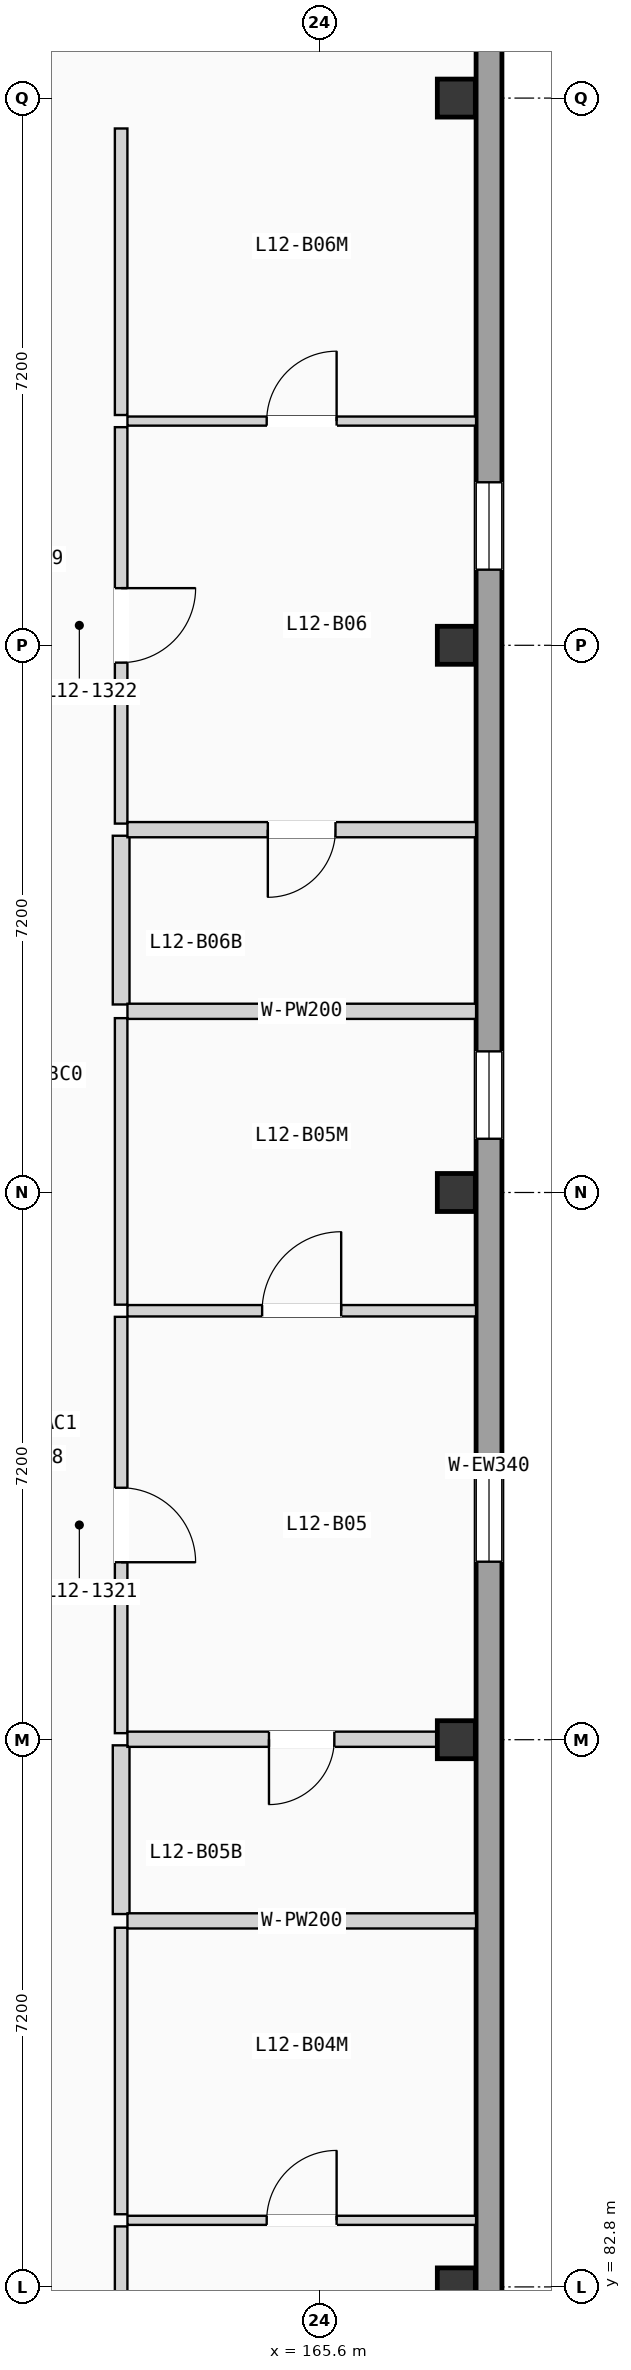
"""IFC4 building model, lengths in metres.
Left out: names, types, materials, properties, quantities, classifications, styles, units other than length and angle.
Written with IfcOpenShell. Run it as: python <this file> out.ifc"""

import sys

from ifc_helpers import new_model, si_unit, direction, frame, frame_2d, origin, origin_2d, place, context, subcontext, project, spatial, rectangle, extrude, element, fill, save


model = new_model("IFC4")
c1 = context("Model", 3, precision=1e-05, world=origin(), true_north=direction((0.0, 1.0)))
c2 = subcontext(c1, "Body", "Model", "MODEL_VIEW")
j1 = project(units=[si_unit("LENGTHUNIT", "METRE"), si_unit("PLANEANGLEUNIT", "RADIAN")], contexts=[c1])
p1 = place(None, origin())
s1 = spatial("IfcSite", under=j1, at=p1, CompositionType="ELEMENT")
p2 = place(p1, origin())
s2 = spatial("IfcBuilding", under=s1, at=p2, CompositionType="ELEMENT")
p3 = place(p2, frame((0.0, 0.0, 40.425)))
s3 = spatial("IfcBuildingStorey", under=s2, at=p3, CompositionType="ELEMENT", Elevation=40.425)
for number, where, z_axis, x_axis in (
    (1, (167.4, 82.8, 0.0), (0.0, 0.0, 1.0), (1.0, 0.0, 0.0)),
    (2, (167.4, 90.0, 0.0), (0.0, 0.0, 1.0), (1.0, 0.0, 0.0)),
    (3, (167.4, 97.2, 0.0), (0.0, 0.0, 1.0), (1.0, 0.0, 0.0)),
    (4, (167.4, 104.4, 0.0), (0.0, 0.0, 1.0), (1.0, 0.0, 0.0)),
    (5, (167.4, 111.6, 0.0), (0.0, 0.0, 1.0), (1.0, 0.0, 0.0)),
):
    element("IfcColumn", number, at=place(p3, frame(where, z_axis=z_axis, x_axis=x_axis)), inside=s3, PredefinedType="COLUMN", context=c2, shape_type="SweptSolid", body=[
        extrude(rectangle(XDim=0.5, YDim=0.5, at=origin_2d()), origin(), (0.0, 0.0, 1.0), 2.85),
    ])
p4 = place(p3, frame((167.83, 68.74, 0.0), z_axis=(0.0, 0.0, 1.0), x_axis=(0.0, 1.0, 0.0)))
e6 = element("IfcWall", 6, at=p4, inside=s3, PredefinedType="SOLIDWALL", context=c2, shape_type="SweptSolid", body=[
    extrude(rectangle(XDim=49.72, YDim=0.34, at=frame_2d((24.86, 0.0))), origin(), (0.0, 0.0, 1.0), 2.55),
])
p5 = place(p4, frame((11.24, 0.0, 0.85)))
e7 = element("IfcOpeningElement", 7, at=p5, cuts=e6, PredefinedType="OPENING", context=c2, shape_type="SweptSolid", body=[
    extrude(rectangle(XDim=0.95, YDim=1.2, at=frame_2d((0.475, 0.6))), frame((0.0, 0.18, 0.0), z_axis=(0.0, -1.0, 0.0), x_axis=(1.0, 0.0, 0.0)), (0.0, 0.0, 1.0), 0.36),
])
p6 = place(p4, frame((23.602, 0.0, 0.75)))
e8 = element("IfcOpeningElement", 8, at=p6, cuts=e6, PredefinedType="OPENING", context=c2, shape_type="SweptSolid", body=[
    extrude(rectangle(XDim=1.15, YDim=1.2, at=frame_2d((0.575, 0.6))), frame((0.0, 0.18, 0.0), z_axis=(0.0, -1.0, 0.0), x_axis=(1.0, 0.0, 0.0)), (0.0, 0.0, 1.0), 0.36),
])
p7 = place(p4, frame((29.167, 0.0, 0.75)))
e9 = element("IfcOpeningElement", 9, at=p7, cuts=e6, PredefinedType="OPENING", context=c2, shape_type="SweptSolid", body=[
    extrude(rectangle(XDim=1.15, YDim=1.35, at=frame_2d((0.575, 0.675))), frame((0.0, 0.18, 0.0), z_axis=(0.0, -1.0, 0.0), x_axis=(1.0, 0.0, 0.0)), (0.0, 0.0, 1.0), 0.36),
])
p8 = place(p4, frame((36.655, 0.0, 0.665)))
e10 = element("IfcOpeningElement", 10, at=p8, cuts=e6, PredefinedType="OPENING", context=c2, shape_type="SweptSolid", body=[
    extrude(rectangle(XDim=1.15, YDim=1.5, at=frame_2d((0.575, 0.75))), frame((0.0, 0.18, 0.0), z_axis=(0.0, -1.0, 0.0), x_axis=(1.0, 0.0, 0.0)), (0.0, 0.0, 1.0), 0.36),
])
p9 = place(p3, frame((162.99, 78.38, 0.0), z_axis=(0.0, 0.0, 1.0), x_axis=(0.0, 1.0, 0.0)))
e11 = element("IfcWall", 11, at=p9, inside=s3, PredefinedType="PARTITIONING", context=c2, shape_type="SweptSolid", body=[
    extrude(rectangle(XDim=5.216, YDim=0.165, at=frame_2d((2.608, 0.0))), origin(), (0.0, 0.0, 1.0), 2.39),
])
p10 = place(p9, frame((2.118, 0.0, 0.0)))
e12 = element("IfcOpeningElement", 12, at=p10, cuts=e11, PredefinedType="OPENING", context=c2, shape_type="SweptSolid", body=[
    extrude(rectangle(XDim=0.98, YDim=2.08, at=frame_2d((0.49, 1.04))), frame((0.0, 0.093, 0.0), z_axis=(0.0, -1.0, 0.0), x_axis=(1.0, 0.0, 0.0)), (0.0, 0.0, 1.0), 0.185),
])
p11 = place(p3, frame((162.99, 83.756, 0.0), z_axis=(0.0, 0.0, 1.0), x_axis=(0.0, 1.0, 0.0)))
e13 = element("IfcWall", 13, at=p11, inside=s3, PredefinedType="PARTITIONING", context=c2, shape_type="SweptSolid", body=[
    extrude(rectangle(XDim=3.77, YDim=0.165, at=frame_2d((1.885, 0.0))), origin(), (0.0, 0.0, 1.0), 2.39),
])
p12 = place(p3, frame((162.99, 87.706, 0.0), z_axis=(0.0, 0.0, 1.0), x_axis=(0.0, 1.0, 0.0)))
e14 = element("IfcWall", 14, at=p12, inside=s3, PredefinedType="PLUMBINGWALL", context=c2, shape_type="SweptSolid", body=[
    extrude(rectangle(XDim=2.22, YDim=0.22, at=frame_2d((1.11, 0.0))), origin(), (0.0, 0.0, 1.0), 2.39),
])
p13 = place(p3, frame((162.99, 90.086, 0.0), z_axis=(0.0, 0.0, 1.0), x_axis=(0.0, 1.0, 0.0)))
e15 = element("IfcWall", 15, at=p13, inside=s3, PredefinedType="PARTITIONING", context=c2, shape_type="SweptSolid", body=[
    extrude(rectangle(XDim=5.478, YDim=0.165, at=frame_2d((2.739, 0.0))), origin(), (0.0, 0.0, 1.0), 2.39),
])
p14 = place(p13, frame((2.249, 0.0, 0.0)))
e16 = element("IfcOpeningElement", 16, at=p14, cuts=e15, PredefinedType="OPENING", context=c2, shape_type="SweptSolid", body=[
    extrude(rectangle(XDim=0.98, YDim=2.08, at=frame_2d((0.49, 1.04))), frame((0.0, 0.093, 0.0), z_axis=(0.0, -1.0, 0.0), x_axis=(1.0, 0.0, 0.0)), (0.0, 0.0, 1.0), 0.185),
])
p15 = place(p3, frame((162.99, 95.724, 0.0), z_axis=(0.0, 0.0, 1.0), x_axis=(0.0, 1.0, 0.0)))
e17 = element("IfcWall", 17, at=p15, inside=s3, PredefinedType="PARTITIONING", context=c2, shape_type="SweptSolid", body=[
    extrude(rectangle(XDim=3.77, YDim=0.165, at=frame_2d((1.885, 0.0))), origin(), (0.0, 0.0, 1.0), 2.39),
])
p16 = place(p3, frame((162.99, 99.674, 0.0), z_axis=(0.0, 0.0, 1.0), x_axis=(0.0, 1.0, 0.0)))
e18 = element("IfcWall", 18, at=p16, inside=s3, PredefinedType="PLUMBINGWALL", context=c2, shape_type="SweptSolid", body=[
    extrude(rectangle(XDim=2.22, YDim=0.22, at=frame_2d((1.11, 0.0))), origin(), (0.0, 0.0, 1.0), 2.39),
])
p17 = place(p3, frame((162.99, 102.054, 0.0), z_axis=(0.0, 0.0, 1.0), x_axis=(0.0, 1.0, 0.0)))
e19 = element("IfcWall", 19, at=p17, inside=s3, PredefinedType="PARTITIONING", context=c2, shape_type="SweptSolid", body=[
    extrude(rectangle(XDim=5.216, YDim=0.165, at=frame_2d((2.608, 0.0))), origin(), (0.0, 0.0, 1.0), 2.39),
])
p18 = place(p17, frame((2.118, 0.0, 0.0)))
e20 = element("IfcOpeningElement", 20, at=p18, cuts=e19, PredefinedType="OPENING", context=c2, shape_type="SweptSolid", body=[
    extrude(rectangle(XDim=0.98, YDim=2.08, at=frame_2d((0.49, 1.04))), frame((0.0, 0.093, 0.0), z_axis=(0.0, -1.0, 0.0), x_axis=(1.0, 0.0, 0.0)), (0.0, 0.0, 1.0), 0.185),
])
p19 = place(p3, frame((162.99, 107.43, 0.0), z_axis=(0.0, 0.0, 1.0), x_axis=(0.0, 1.0, 0.0)))
e21 = element("IfcWall", 21, at=p19, inside=s3, PredefinedType="PARTITIONING", context=c2, shape_type="SweptSolid", body=[
    extrude(rectangle(XDim=3.77, YDim=0.165, at=frame_2d((1.885, 0.0))), origin(), (0.0, 0.0, 1.0), 2.39),
])
p20 = place(p3, frame((163.073, 83.676, 0.0), z_axis=(0.0, 0.0, 1.0), x_axis=(1.0, 0.0, 0.0)))
e22 = element("IfcWall", 22, at=p20, inside=s3, PredefinedType="PARTITIONING", context=c2, shape_type="SweptSolid", body=[
    extrude(rectangle(XDim=4.587, YDim=0.12, at=frame_2d((2.293, 0.0))), origin(), (0.0, 0.0, 1.0), 2.39),
])
p21 = place(p20, frame((1.832, 0.0, 0.0)))
e23 = element("IfcOpeningElement", 23, at=p21, cuts=e22, PredefinedType="OPENING", context=c2, shape_type="SweptSolid", body=[
    extrude(rectangle(XDim=0.92, YDim=2.02, at=frame_2d((0.46, 1.01))), frame((0.0, 0.07, 0.0), z_axis=(0.0, -1.0, 0.0), x_axis=(1.0, 0.0, 0.0)), (0.0, 0.0, 1.0), 0.14),
])
p22 = place(p3, frame((163.073, 87.616, 0.0), z_axis=(0.0, 0.0, 1.0), x_axis=(1.0, 0.0, 0.0)))
e24 = element("IfcWall", 24, at=p22, inside=s3, PredefinedType="PLUMBINGWALL", context=c2, shape_type="SweptSolid", body=[
    extrude(rectangle(XDim=4.587, YDim=0.2, at=frame_2d((2.293, 0.0))), origin(), (0.0, 0.0, 1.0), 2.39),
])
p23 = place(p3, frame((163.073, 90.006, 0.0), z_axis=(0.0, 0.0, 1.0), x_axis=(1.0, 0.0, 0.0)))
e25 = element("IfcWall", 25, at=p23, inside=s3, PredefinedType="PLUMBINGWALL", context=c2, shape_type="SweptSolid", body=[
    extrude(rectangle(XDim=4.587, YDim=0.2, at=frame_2d((2.293, 0.0))), origin(), (0.0, 0.0, 1.0), 2.12),
])
p24 = place(p23, frame((1.862, 0.0, 0.0)))
e26 = element("IfcOpeningElement", 26, at=p24, cuts=e25, PredefinedType="OPENING", context=c2, shape_type="SweptSolid", body=[
    extrude(rectangle(XDim=0.86, YDim=2.0, at=frame_2d((0.43, 1.0))), frame((0.0, 0.11, 0.0), z_axis=(0.0, -1.0, 0.0), x_axis=(1.0, 0.0, 0.0)), (0.0, 0.0, 1.0), 0.22),
])
p25 = place(p3, frame((163.073, 95.644, 0.0), z_axis=(0.0, 0.0, 1.0), x_axis=(1.0, 0.0, 0.0)))
e27 = element("IfcWall", 27, at=p25, inside=s3, PredefinedType="PARTITIONING", context=c2, shape_type="SweptSolid", body=[
    extrude(rectangle(XDim=4.587, YDim=0.15, at=frame_2d((2.293, 0.0))), origin(), (0.0, 0.0, 1.0), 2.39),
])
p26 = place(p25, frame((1.772, 0.0, 0.0)))
e28 = element("IfcOpeningElement", 28, at=p26, cuts=e27, PredefinedType="OPENING", context=c2, shape_type="SweptSolid", body=[
    extrude(rectangle(XDim=1.04, YDim=2.08, at=frame_2d((0.52, 1.04))), frame((0.0, 0.085, 0.0), z_axis=(0.0, -1.0, 0.0), x_axis=(1.0, 0.0, 0.0)), (0.0, 0.0, 1.0), 0.17),
])
p27 = place(p3, frame((163.073, 99.584, 0.0), z_axis=(0.0, 0.0, 1.0), x_axis=(1.0, 0.0, 0.0)))
e29 = element("IfcWall", 29, at=p27, inside=s3, PredefinedType="PLUMBINGWALL", context=c2, shape_type="SweptSolid", body=[
    extrude(rectangle(XDim=4.587, YDim=0.2, at=frame_2d((2.293, 0.0))), origin(), (0.0, 0.0, 1.0), 2.39),
])
p28 = place(p3, frame((163.073, 101.974, 0.0), z_axis=(0.0, 0.0, 1.0), x_axis=(1.0, 0.0, 0.0)))
e30 = element("IfcWall", 30, at=p28, inside=s3, PredefinedType="PLUMBINGWALL", context=c2, shape_type="SweptSolid", body=[
    extrude(rectangle(XDim=4.587, YDim=0.2, at=frame_2d((2.293, 0.0))), origin(), (0.0, 0.0, 1.0), 2.39),
])
p29 = place(p28, frame((1.847, 0.0, 0.0)))
e31 = element("IfcOpeningElement", 31, at=p29, cuts=e30, PredefinedType="OPENING", context=c2, shape_type="SweptSolid", body=[
    extrude(rectangle(XDim=0.89, YDim=2.03, at=frame_2d((0.445, 1.015))), frame((0.0, 0.11, 0.0), z_axis=(0.0, -1.0, 0.0), x_axis=(1.0, 0.0, 0.0)), (0.0, 0.0, 1.0), 0.22),
])
p30 = place(p3, frame((163.073, 107.35, 0.0), z_axis=(0.0, 0.0, 1.0), x_axis=(1.0, 0.0, 0.0)))
e32 = element("IfcWall", 32, at=p30, inside=s3, PredefinedType="PARTITIONING", context=c2, shape_type="SweptSolid", body=[
    extrude(rectangle(XDim=4.587, YDim=0.12, at=frame_2d((2.293, 0.0))), origin(), (0.0, 0.0, 1.0), 2.39),
])
p31 = place(p30, frame((1.832, 0.0, 0.0)))
e33 = element("IfcOpeningElement", 33, at=p31, cuts=e32, PredefinedType="OPENING", context=c2, shape_type="SweptSolid", body=[
    extrude(rectangle(XDim=0.92, YDim=2.02, at=frame_2d((0.46, 1.01))), frame((0.0, 0.07, 0.0), z_axis=(0.0, -1.0, 0.0), x_axis=(1.0, 0.0, 0.0)), (0.0, 0.0, 1.0), 0.14),
])
p32 = place(p6, origin())
e34 = element("IfcWindow", 34, at=p32, inside=s3, PartitioningType="SINGLE_PANEL", PredefinedType="WINDOW", context=c2, shape_type="SweptSolid", body=[
    extrude(rectangle(XDim=1.15, YDim=1.2, at=frame_2d((0.575, 0.6))), frame((0.0, 0.03, 0.0), z_axis=(0.0, -1.0, 0.0), x_axis=(1.0, 0.0, 0.0)), (0.0, 0.0, 1.0), 0.06),
])
fill(e8, e34)
p33 = place(p7, origin())
e35 = element("IfcWindow", 35, at=p33, inside=s3, PartitioningType="SINGLE_PANEL", PredefinedType="WINDOW", context=c2, shape_type="SweptSolid", body=[
    extrude(rectangle(XDim=1.15, YDim=1.35, at=frame_2d((0.575, 0.675))), frame((0.0, 0.03, 0.0), z_axis=(0.0, -1.0, 0.0), x_axis=(1.0, 0.0, 0.0)), (0.0, 0.0, 1.0), 0.06),
])
fill(e9, e35)
p34 = place(p8, origin())
e36 = element("IfcWindow", 36, at=p34, inside=s3, PartitioningType="SINGLE_PANEL", PredefinedType="WINDOW", context=c2, shape_type="SweptSolid", body=[
    extrude(rectangle(XDim=1.15, YDim=1.5, at=frame_2d((0.575, 0.75))), frame((0.0, 0.03, 0.0), z_axis=(0.0, -1.0, 0.0), x_axis=(1.0, 0.0, 0.0)), (0.0, 0.0, 1.0), 0.06),
])
fill(e10, e36)
p35 = place(p14, frame((0.98, 0.0, 0.0), z_axis=(0.0, 0.0, 1.0), x_axis=(-1.0, 0.0, 0.0)))
e37 = element("IfcDoor", 37, at=p35, inside=s3, OperationType="SINGLE_SWING_LEFT", PredefinedType="DOOR", context=c2, shape_type="SweptSolid", body=[
    extrude(rectangle(XDim=0.98, YDim=2.08, at=frame_2d((0.49, 1.04))), frame((0.0, 0.025, 0.0), z_axis=(0.0, -1.0, 0.0), x_axis=(1.0, 0.0, 0.0)), (0.0, 0.0, 1.0), 0.05),
])
fill(e16, e37)
p36 = place(p18, frame((0.98, 0.0, 0.0), z_axis=(0.0, 0.0, 1.0), x_axis=(-1.0, 0.0, 0.0)))
e38 = element("IfcDoor", 38, at=p36, inside=s3, OperationType="SINGLE_SWING_RIGHT", PredefinedType="DOOR", context=c2, shape_type="SweptSolid", body=[
    extrude(rectangle(XDim=0.98, YDim=2.08, at=frame_2d((0.49, 1.04))), frame((0.0, 0.025, 0.0), z_axis=(0.0, -1.0, 0.0), x_axis=(1.0, 0.0, 0.0)), (0.0, 0.0, 1.0), 0.05),
])
fill(e20, e38)
p37 = place(p21, origin())
e39 = element("IfcDoor", 39, at=p37, inside=s3, OperationType="SINGLE_SWING_RIGHT", PredefinedType="DOOR", context=c2, shape_type="SweptSolid", body=[
    extrude(rectangle(XDim=0.92, YDim=2.02, at=frame_2d((0.46, 1.01))), frame((0.0, 0.025, 0.0), z_axis=(0.0, -1.0, 0.0), x_axis=(1.0, 0.0, 0.0)), (0.0, 0.0, 1.0), 0.05),
])
fill(e23, e39)
p38 = place(p24, frame((0.86, 0.0, 0.0), z_axis=(0.0, 0.0, 1.0), x_axis=(-1.0, 0.0, 0.0)))
e40 = element("IfcDoor", 40, at=p38, inside=s3, OperationType="SINGLE_SWING_LEFT", PredefinedType="DOOR", context=c2, shape_type="SweptSolid", body=[
    extrude(rectangle(XDim=0.86, YDim=2.0, at=frame_2d((0.43, 1.0))), frame((0.0, 0.025, 0.0), z_axis=(0.0, -1.0, 0.0), x_axis=(1.0, 0.0, 0.0)), (0.0, 0.0, 1.0), 0.05),
])
fill(e26, e40)
p39 = place(p26, origin())
e41 = element("IfcDoor", 41, at=p39, inside=s3, OperationType="SINGLE_SWING_RIGHT", PredefinedType="DOOR", context=c2, shape_type="SweptSolid", body=[
    extrude(rectangle(XDim=1.04, YDim=2.08, at=frame_2d((0.52, 1.04))), frame((0.0, 0.025, 0.0), z_axis=(0.0, -1.0, 0.0), x_axis=(1.0, 0.0, 0.0)), (0.0, 0.0, 1.0), 0.05),
])
fill(e28, e41)
p40 = place(p29, frame((0.89, 0.0, 0.0), z_axis=(0.0, 0.0, 1.0), x_axis=(-1.0, 0.0, 0.0)))
e42 = element("IfcDoor", 42, at=p40, inside=s3, OperationType="SINGLE_SWING_LEFT", PredefinedType="DOOR", context=c2, shape_type="SweptSolid", body=[
    extrude(rectangle(XDim=0.89, YDim=2.03, at=frame_2d((0.445, 1.015))), frame((0.0, 0.025, 0.0), z_axis=(0.0, -1.0, 0.0), x_axis=(1.0, 0.0, 0.0)), (0.0, 0.0, 1.0), 0.05),
])
fill(e31, e42)
p41 = place(p31, origin())
e43 = element("IfcDoor", 43, at=p41, inside=s3, OperationType="SINGLE_SWING_RIGHT", PredefinedType="DOOR", context=c2, shape_type="SweptSolid", body=[
    extrude(rectangle(XDim=0.92, YDim=2.02, at=frame_2d((0.46, 1.01))), frame((0.0, 0.025, 0.0), z_axis=(0.0, -1.0, 0.0), x_axis=(1.0, 0.0, 0.0)), (0.0, 0.0, 1.0), 0.05),
])
fill(e33, e43)
save(model, sys.argv[1])
